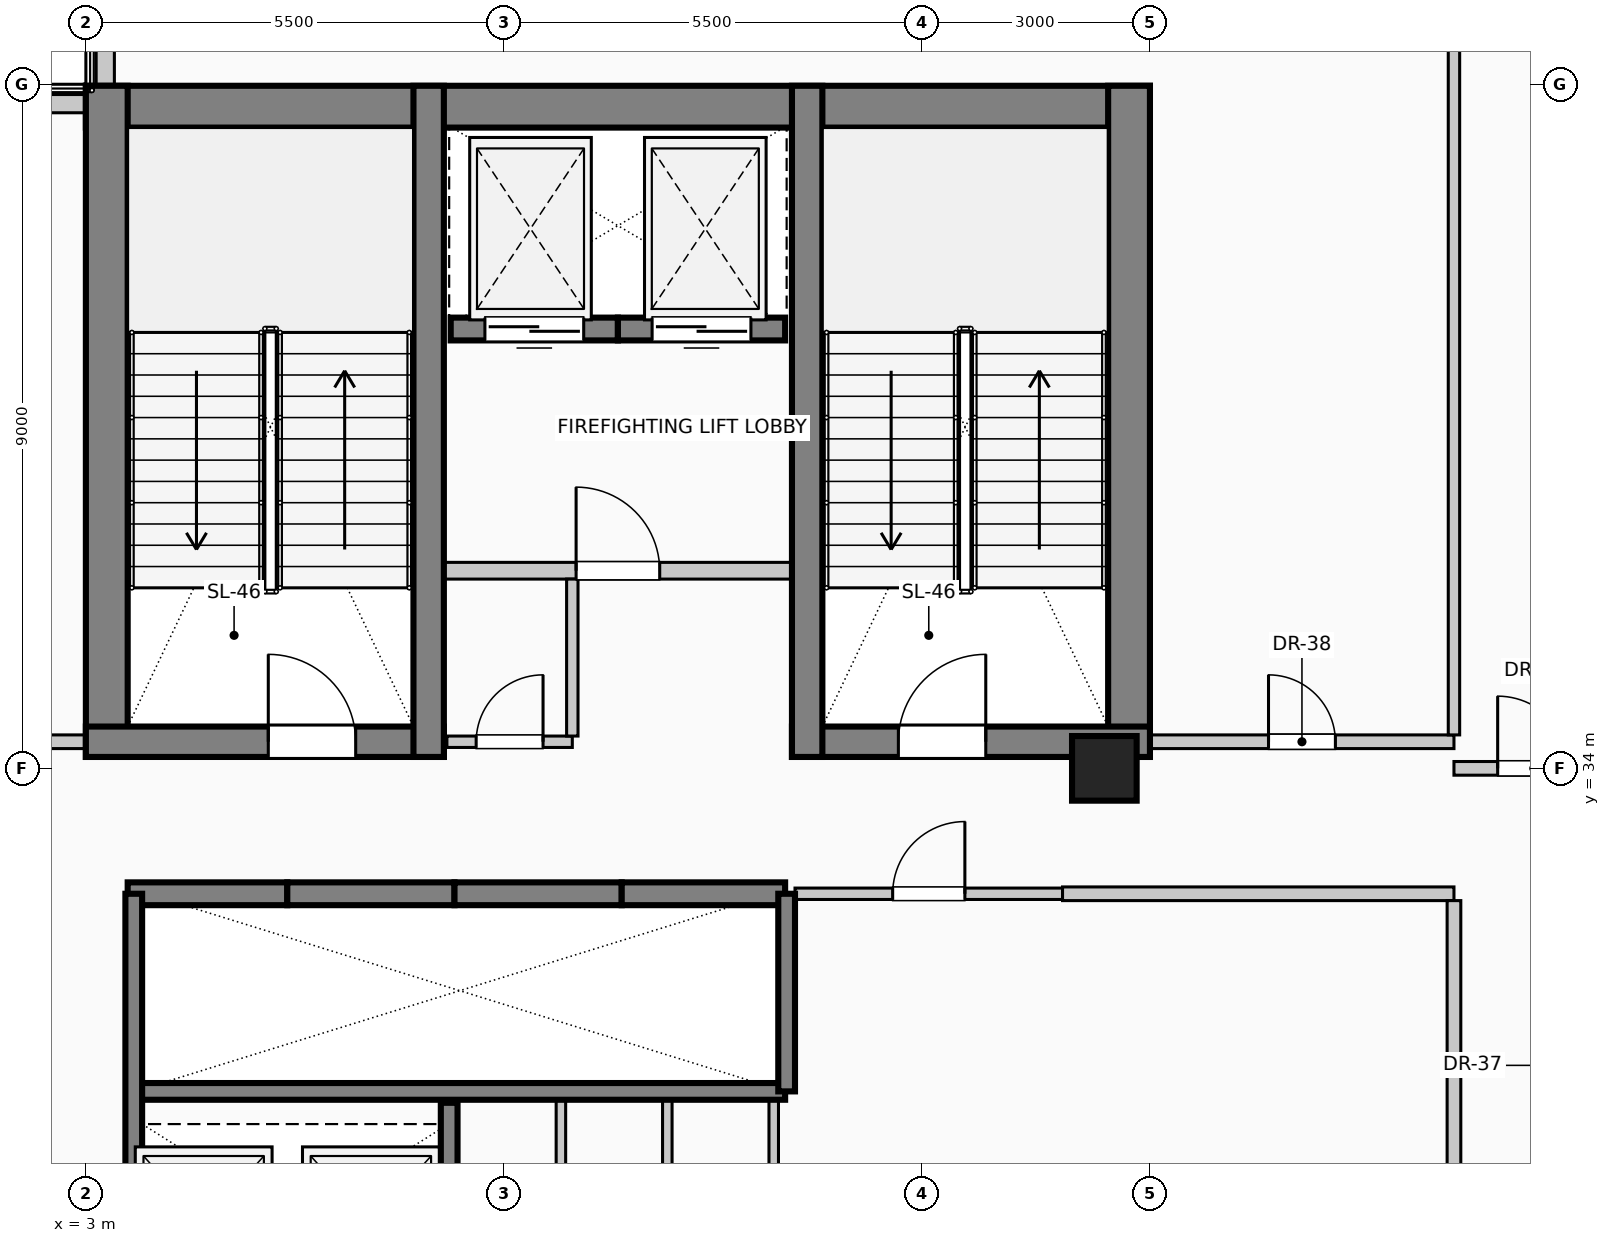
"""IFC4 building model, lengths in metres.
Left out: names, types, materials, properties, quantities, classifications, styles, units other than length and angle.
Written with IfcOpenShell. Run it as: python <this file> out.ifc"""

import sys

from ifc_helpers import new_model, si_unit, direction, frame, frame_2d, origin, origin_2d, place, context, subcontext, project, spatial, rectangle, circle, extrude, element, fill, save


model = new_model("IFC4")
c1 = context("Model", 3, precision=1e-05, world=origin(), true_north=direction((0.0, 1.0)))
c2 = subcontext(c1, "Body", "Model", "MODEL_VIEW")
j1 = project(units=[si_unit("LENGTHUNIT", "METRE"), si_unit("PLANEANGLEUNIT", "RADIAN")], contexts=[c1])
p1 = place(None, origin())
s1 = spatial("IfcSite", under=j1, at=p1, CompositionType="ELEMENT")
p2 = place(p1, origin())
s2 = spatial("IfcBuilding", under=s1, at=p2, CompositionType="ELEMENT")
p3 = place(p2, frame((0.0, 0.0, 313.0)))
s3 = spatial("IfcBuildingStorey", under=s2, at=p3, CompositionType="ELEMENT", Elevation=313.0)
p4 = place(p3, frame((3.0, 42.705, 0.0), z_axis=(0.0, 0.0, 1.0), x_axis=(1.0, 0.0, 0.0)))
e1 = element("IfcWall", 1, at=p4, inside=s3, PredefinedType="SHEAR", context=c2, shape_type="SweptSolid", body=[
    extrude(rectangle(XDim=14.0, YDim=0.55, at=frame_2d((7.0, 0.0))), origin(), (0.0, 0.0, 1.0), 4.8),
])
for number, where, z_axis, x_axis in (
    (2, (3.275, 34.15, 0.0), (0.0, 0.0, 1.0), (0.0, 1.0, 0.0)),
    (3, (16.725, 34.15, 0.0), (0.0, 0.0, 1.0), (0.0, 1.0, 0.0)),
):
    element("IfcWall", number, at=place(p3, frame(where, z_axis=z_axis, x_axis=x_axis)), inside=s3, PredefinedType="SHEAR", context=c2, shape_type="SweptSolid", body=[
        extrude(rectangle(XDim=8.83, YDim=0.55, at=frame_2d((4.415, 0.0))), origin(), (0.0, 0.0, 1.0), 4.8),
    ])
p5 = place(p3, frame((3.0, 34.35, 0.0), z_axis=(0.0, 0.0, 1.0), x_axis=(1.0, 0.0, 0.0)))
e4 = element("IfcWall", 4, at=p5, inside=s3, PredefinedType="SHEAR", context=c2, shape_type="SweptSolid", body=[
    extrude(rectangle(XDim=4.71, YDim=0.4, at=frame_2d((2.355, 0.0))), origin(), (0.0, 0.0, 1.0), 4.8),
])
p6 = place(p5, frame((2.4, 0.0, 0.0)))
e5 = element("IfcOpeningElement", 5, at=p6, cuts=e4, PredefinedType="OPENING", context=c2, shape_type="SweptSolid", body=[
    extrude(rectangle(XDim=1.15, YDim=2.2, at=frame_2d((0.575, 1.1))), frame((0.0, 0.21, 0.0), z_axis=(0.0, -1.0, 0.0), x_axis=(1.0, 0.0, 0.0)), (0.0, 0.0, 1.0), 0.42),
])
p7 = place(p3, frame((12.29, 34.35, 0.0), z_axis=(0.0, 0.0, 1.0), x_axis=(1.0, 0.0, 0.0)))
e6 = element("IfcWall", 6, at=p7, inside=s3, PredefinedType="SHEAR", context=c2, shape_type="SweptSolid", body=[
    extrude(rectangle(XDim=4.71, YDim=0.4, at=frame_2d((2.355, 0.0))), origin(), (0.0, 0.0, 1.0), 4.8),
])
p8 = place(p7, frame((1.4, 0.0, 0.0)))
e7 = element("IfcOpeningElement", 7, at=p8, cuts=e6, PredefinedType="OPENING", context=c2, shape_type="SweptSolid", body=[
    extrude(rectangle(XDim=1.15, YDim=2.2, at=frame_2d((0.575, 1.1))), frame((0.0, 0.21, 0.0), z_axis=(0.0, -1.0, 0.0), x_axis=(1.0, 0.0, 0.0)), (0.0, 0.0, 1.0), 0.42),
])
for number, where, z_axis, x_axis in (
    (8, (7.51, 34.15, 0.0), (0.0, 0.0, 1.0), (0.0, 1.0, 0.0)),
    (9, (12.49, 34.15, 0.0), (0.0, 0.0, 1.0), (0.0, 1.0, 0.0)),
):
    element("IfcWall", number, at=place(p3, frame(where, z_axis=z_axis, x_axis=x_axis)), inside=s3, PredefinedType="SHEAR", context=c2, shape_type="SweptSolid", body=[
        extrude(rectangle(XDim=8.83, YDim=0.4, at=frame_2d((4.415, 0.0))), origin(), (0.0, 0.0, 1.0), 4.8),
    ])
p9 = place(p3, frame((16.4, 34.0, 0.0), z_axis=(0.0, 0.0, 1.0), x_axis=(1.0, 0.0, 0.0)))
e10 = element("IfcColumn", 10, at=p9, inside=s3, PredefinedType="COLUMN", context=c2, shape_type="SweptSolid", body=[
    extrude(circle(Radius=0.425, at=origin_2d()), origin(), (0.0, 0.0, 1.0), 4.8),
])
p10 = place(p3, frame((0.6, 42.745, 0.0), z_axis=(0.0, 0.0, 1.0), x_axis=(1.0, 0.0, 0.0)))
e11 = element("IfcWall", 11, at=p10, inside=s3, PredefinedType="SOLIDWALL", context=c2, shape_type="SweptSolid", body=[
    extrude(rectangle(XDim=2.395, YDim=0.24, at=frame_2d((1.198, 0.0))), origin(), (0.0, 0.0, 1.0), 4.46),
])
p11 = place(p3, frame((3.255, 42.985, 0.0), z_axis=(0.0, 0.0, 1.0), x_axis=(0.0, 1.0, 0.0)))
e12 = element("IfcWall", 12, at=p11, inside=s3, PredefinedType="SOLIDWALL", context=c2, shape_type="SweptSolid", body=[
    extrude(rectangle(XDim=2.415, YDim=0.24, at=frame_2d((1.208, 0.0))), origin(), (0.0, 0.0, 1.0), 4.46),
])
p12 = place(p3, frame((3.55, 32.35, 0.0), z_axis=(0.0, 0.0, 1.0), x_axis=(1.0, 0.0, 0.0)))
e13 = element("IfcWall", 13, at=p12, inside=s3, PredefinedType="SOLIDWALL", context=c2, shape_type="SweptSolid", body=[
    extrude(rectangle(XDim=2.1, YDim=0.3, at=frame_2d((1.05, 0.0))), origin(), (0.0, 0.0, 1.0), 4.8),
])
p13 = place(p3, frame((5.65, 32.35, 0.0), z_axis=(0.0, 0.0, 1.0), x_axis=(1.0, 0.0, 0.0)))
e14 = element("IfcWall", 14, at=p13, inside=s3, PredefinedType="SOLIDWALL", context=c2, shape_type="SweptSolid", body=[
    extrude(rectangle(XDim=2.2, YDim=0.3, at=frame_2d((1.1, 0.0))), origin(), (0.0, 0.0, 1.0), 4.8),
])
p14 = place(p3, frame((7.85, 32.35, 0.0), z_axis=(0.0, 0.0, 1.0), x_axis=(1.0, 0.0, 0.0)))
e15 = element("IfcWall", 15, at=p14, inside=s3, PredefinedType="SOLIDWALL", context=c2, shape_type="SweptSolid", body=[
    extrude(rectangle(XDim=2.2, YDim=0.3, at=frame_2d((1.1, 0.0))), origin(), (0.0, 0.0, 1.0), 4.8),
])
p15 = place(p3, frame((10.05, 32.35, 0.0), z_axis=(0.0, 0.0, 1.0), x_axis=(1.0, 0.0, 0.0)))
e16 = element("IfcWall", 16, at=p15, inside=s3, PredefinedType="SOLIDWALL", context=c2, shape_type="SweptSolid", body=[
    extrude(rectangle(XDim=2.15, YDim=0.3, at=frame_2d((1.075, 0.0))), origin(), (0.0, 0.0, 1.0), 4.8),
])
p16 = place(p3, frame((10.0, 39.78, 0.0), z_axis=(0.0, 0.0, 1.0), x_axis=(-1.0, 0.0, 0.0)))
e17 = element("IfcWall", 17, at=p16, inside=s3, PredefinedType="SOLIDWALL", context=c2, shape_type="SweptSolid", body=[
    extrude(rectangle(XDim=2.2, YDim=0.3, at=frame_2d((1.1, 0.0))), origin(), (0.0, 0.0, 1.0), 4.8),
])
p17 = place(p16, frame((0.45, 0.0, 0.0)))
e18 = element("IfcOpeningElement", 18, at=p17, cuts=e17, PredefinedType="OPENING", context=c2, shape_type="SweptSolid", body=[
    extrude(rectangle(XDim=1.3, YDim=2.25, at=frame_2d((0.65, 1.125))), frame((0.0, 0.16, 0.0), z_axis=(0.0, -1.0, 0.0), x_axis=(1.0, 0.0, 0.0)), (0.0, 0.0, 1.0), 0.32),
])
p18 = place(p3, frame((12.2, 39.78, 0.0), z_axis=(0.0, 0.0, 1.0), x_axis=(-1.0, 0.0, 0.0)))
e19 = element("IfcWall", 19, at=p18, inside=s3, PredefinedType="SOLIDWALL", context=c2, shape_type="SweptSolid", body=[
    extrude(rectangle(XDim=2.2, YDim=0.3, at=frame_2d((1.1, 0.0))), origin(), (0.0, 0.0, 1.0), 4.8),
])
p19 = place(p18, frame((0.45, 0.0, 0.0)))
e20 = element("IfcOpeningElement", 20, at=p19, cuts=e19, PredefinedType="OPENING", context=c2, shape_type="SweptSolid", body=[
    extrude(rectangle(XDim=1.3, YDim=2.25, at=frame_2d((0.65, 1.125))), frame((0.0, 0.16, 0.0), z_axis=(0.0, -1.0, 0.0), x_axis=(1.0, 0.0, 0.0)), (0.0, 0.0, 1.0), 0.32),
])
p20 = place(p3, frame((3.55, 29.75, 0.0), z_axis=(0.0, 0.0, 1.0), x_axis=(1.0, 0.0, 0.0)))
e21 = element("IfcWall", 21, at=p20, inside=s3, PredefinedType="SOLIDWALL", context=c2, shape_type="SweptSolid", body=[
    extrude(rectangle(XDim=8.65, YDim=0.22, at=frame_2d((4.325, 0.0))), origin(), (0.0, 0.0, 1.0), 4.8),
])
p21 = place(p3, frame((3.63, 26.8, 0.0), z_axis=(0.0, 0.0, 1.0), x_axis=(0.0, 1.0, 0.0)))
e22 = element("IfcWall", 22, at=p21, inside=s3, PredefinedType="SOLIDWALL", context=c2, shape_type="SweptSolid", body=[
    extrude(rectangle(XDim=5.55, YDim=0.22, at=frame_2d((2.775, 0.0))), origin(), (0.0, 0.0, 1.0), 4.8),
])
p22 = place(p3, frame((7.78, 26.8, 0.0), z_axis=(0.0, 0.0, 1.0), x_axis=(0.0, 1.0, 0.0)))
e23 = element("IfcWall", 23, at=p22, inside=s3, PredefinedType="SOLIDWALL", context=c2, shape_type="SweptSolid", body=[
    extrude(rectangle(XDim=2.8, YDim=0.22, at=frame_2d((1.4, 0.0))), origin(), (0.0, 0.0, 1.0), 4.8),
])
p23 = place(p3, frame((12.22, 29.75, 0.0), z_axis=(0.0, 0.0, 1.0), x_axis=(0.0, 1.0, 0.0)))
e24 = element("IfcWall", 24, at=p23, inside=s3, PredefinedType="SOLIDWALL", context=c2, shape_type="SweptSolid", body=[
    extrude(rectangle(XDim=2.6, YDim=0.22, at=frame_2d((1.3, 0.0))), origin(), (0.0, 0.0, 1.0), 4.8),
])
p24 = place(p3, frame((7.51, 36.6, 0.0), z_axis=(0.0, 0.0, 1.0), x_axis=(1.0, 0.0, 0.0)))
e25 = element("IfcWall", 25, at=p24, inside=s3, PredefinedType="PARTITIONING", context=c2, shape_type="SweptSolid", body=[
    extrude(rectangle(XDim=4.98, YDim=0.22, at=frame_2d((2.49, 0.0))), origin(), (0.0, 0.0, 1.0), 4.46),
])
p25 = place(p24, frame((1.94, 0.0, 0.0)))
e26 = element("IfcOpeningElement", 26, at=p25, cuts=e25, PredefinedType="OPENING", context=c2, shape_type="SweptSolid", body=[
    extrude(rectangle(XDim=1.1, YDim=2.2, at=frame_2d((0.55, 1.1))), frame((0.0, 0.12, 0.0), z_axis=(0.0, -1.0, 0.0), x_axis=(1.0, 0.0, 0.0)), (0.0, 0.0, 1.0), 0.24),
])
p26 = place(p3, frame((12.33, 32.35, 0.0), z_axis=(0.0, 0.0, 1.0), x_axis=(1.0, 0.0, 0.0)))
e27 = element("IfcWall", 27, at=p26, inside=s3, PredefinedType="PARTITIONING", context=c2, shape_type="SweptSolid", body=[
    extrude(rectangle(XDim=3.52, YDim=0.15, at=frame_2d((1.76, 0.0))), origin(), (0.0, 0.0, 1.0), 4.46),
])
p27 = place(p26, frame((1.285, 0.0, 0.0)))
e28 = element("IfcOpeningElement", 28, at=p27, cuts=e27, PredefinedType="OPENING", context=c2, shape_type="SweptSolid", body=[
    extrude(rectangle(XDim=0.95, YDim=2.15, at=frame_2d((0.475, 1.075))), frame((0.0, 0.085, 0.0), z_axis=(0.0, -1.0, 0.0), x_axis=(1.0, 0.0, 0.0)), (0.0, 0.0, 1.0), 0.17),
])
p28 = place(p3, frame((15.85, 32.35, 0.0), z_axis=(0.0, 0.0, 1.0), x_axis=(1.0, 0.0, 0.0)))
e29 = element("IfcWall", 29, at=p28, inside=s3, PredefinedType="PARTITIONING", context=c2, shape_type="SweptSolid", body=[
    extrude(rectangle(XDim=5.15, YDim=0.18, at=frame_2d((2.575, 0.0))), origin(), (0.0, 0.0, 1.0), 4.46),
])
p29 = place(p3, frame((21.0, 34.0, 0.0), z_axis=(0.0, 0.0, 1.0), x_axis=(1.0, 0.0, 0.0)))
e30 = element("IfcWall", 30, at=p29, inside=s3, PredefinedType="PARTITIONING", context=c2, shape_type="SweptSolid", body=[
    extrude(rectangle(XDim=2.1, YDim=0.18, at=frame_2d((1.05, 0.0))), origin(), (0.0, 0.0, 1.0), 2.855),
])
p30 = place(p29, frame((0.575, 0.0, 0.0)))
e31 = element("IfcOpeningElement", 31, at=p30, cuts=e30, PredefinedType="OPENING", context=c2, shape_type="SweptSolid", body=[
    extrude(rectangle(XDim=0.95, YDim=2.15, at=frame_2d((0.475, 1.075))), frame((0.0, 0.1, 0.0), z_axis=(0.0, -1.0, 0.0), x_axis=(1.0, 0.0, 0.0)), (0.0, 0.0, 1.0), 0.2),
])
p31 = place(p3, frame((1.05, 34.35, 0.0), z_axis=(0.0, 0.0, 1.0), x_axis=(1.0, 0.0, 0.0)))
e32 = element("IfcWall", 32, at=p31, inside=s3, PredefinedType="PARTITIONING", context=c2, shape_type="SweptSolid", body=[
    extrude(rectangle(XDim=1.95, YDim=0.18, at=frame_2d((0.975, 0.0))), origin(), (0.0, 0.0, 1.0), 4.46),
])
p32 = place(p3, frame((7.75, 34.35, 0.0), z_axis=(0.0, 0.0, 1.0), x_axis=(1.0, 0.0, 0.0)))
e33 = element("IfcWall", 33, at=p32, inside=s3, PredefinedType="PARTITIONING", context=c2, shape_type="SweptSolid", body=[
    extrude(rectangle(XDim=1.65, YDim=0.15, at=frame_2d((0.825, 0.0))), origin(), (0.0, 0.0, 1.0), 4.46),
])
p33 = place(p32, frame((0.385, 0.0, 0.0)))
e34 = element("IfcOpeningElement", 34, at=p33, cuts=e33, PredefinedType="OPENING", context=c2, shape_type="SweptSolid", body=[
    extrude(rectangle(XDim=0.88, YDim=2.1, at=frame_2d((0.44, 1.05))), frame((0.0, 0.085, 0.0), z_axis=(0.0, -1.0, 0.0), x_axis=(1.0, 0.0, 0.0)), (0.0, 0.0, 1.0), 0.17),
])
p34 = place(p3, frame((17.0, 34.35, 0.0), z_axis=(0.0, 0.0, 1.0), x_axis=(1.0, 0.0, 0.0)))
e35 = element("IfcWall", 35, at=p34, inside=s3, PredefinedType="PARTITIONING", context=c2, shape_type="SweptSolid", body=[
    extrude(rectangle(XDim=4.0, YDim=0.18, at=frame_2d((2.0, 0.0))), origin(), (0.0, 0.0, 1.0), 2.855),
])
p35 = place(p34, frame((1.56, 0.0, 0.0)))
e36 = element("IfcOpeningElement", 36, at=p35, cuts=e35, PredefinedType="OPENING", context=c2, shape_type="SweptSolid", body=[
    extrude(rectangle(XDim=0.88, YDim=2.1, at=frame_2d((0.44, 1.05))), frame((0.0, 0.1, 0.0), z_axis=(0.0, -1.0, 0.0), x_axis=(1.0, 0.0, 0.0)), (0.0, 0.0, 1.0), 0.2),
])
p36 = place(p3, frame((9.25, 26.863, 0.0), z_axis=(0.0, 0.0, 1.0), x_axis=(0.0, 1.0, 0.0)))
e37 = element("IfcWall", 37, at=p36, inside=s3, PredefinedType="PARTITIONING", context=c2, shape_type="SweptSolid", body=[
    extrude(rectangle(XDim=2.777, YDim=0.125, at=frame_2d((1.389, 0.0))), origin(), (0.0, 0.0, 1.0), 4.46),
])
p37 = place(p3, frame((9.4, 34.425, 0.0), z_axis=(0.0, 0.0, 1.0), x_axis=(0.0, 1.0, 0.0)))
e38 = element("IfcWall", 38, at=p37, inside=s3, PredefinedType="PARTITIONING", context=c2, shape_type="SweptSolid", body=[
    extrude(rectangle(XDim=2.065, YDim=0.15, at=frame_2d((1.032, 0.0))), origin(), (0.0, 0.0, 1.0), 4.46),
])
for number, where, z_axis, x_axis in (
    (39, (10.65, 26.863, 0.0), (0.0, 0.0, 1.0), (0.0, 1.0, 0.0)),
    (40, (12.05, 26.863, 0.0), (0.0, 0.0, 1.0), (0.0, 1.0, 0.0)),
):
    element("IfcWall", number, at=place(p3, frame(where, z_axis=z_axis, x_axis=x_axis)), inside=s3, PredefinedType="PARTITIONING", context=c2, shape_type="SweptSolid", body=[
        extrude(rectangle(XDim=2.777, YDim=0.125, at=frame_2d((1.389, 0.0))), origin(), (0.0, 0.0, 1.0), 4.46),
    ])
p38 = place(p3, frame((21.0, 24.875, 0.0), z_axis=(0.0, 0.0, 1.0), x_axis=(0.0, 1.0, 0.0)))
e41 = element("IfcWall", 41, at=p38, inside=s3, PredefinedType="PARTITIONING", context=c2, shape_type="SweptSolid", body=[
    extrude(rectangle(XDim=7.385, YDim=0.18, at=frame_2d((3.692, 0.0))), origin(), (0.0, 0.0, 1.0), 4.46),
])
p39 = place(p3, frame((21.0, 34.44, 0.0), z_axis=(0.0, 0.0, 1.0), x_axis=(0.0, 1.0, 0.0)))
e42 = element("IfcWall", 42, at=p39, inside=s3, PredefinedType="PARTITIONING", context=c2, shape_type="SweptSolid", body=[
    extrude(rectangle(XDim=10.84, YDim=0.15, at=frame_2d((5.42, 0.0))), origin(), (0.0, 0.0, 1.0), 4.46),
])
p40 = place(p17, origin())
e43 = element("IfcDoor", 43, at=p40, inside=s3, OperationType="SLIDING_TO_LEFT", PredefinedType="DOOR", context=c2, shape_type="SweptSolid", body=[
    extrude(rectangle(XDim=1.3, YDim=2.25, at=frame_2d((0.65, 1.125))), frame((0.0, 0.025, 0.0), z_axis=(0.0, -1.0, 0.0), x_axis=(1.0, 0.0, 0.0)), (0.0, 0.0, 1.0), 0.05),
])
fill(e18, e43)
p41 = place(p19, origin())
e44 = element("IfcDoor", 44, at=p41, inside=s3, OperationType="SLIDING_TO_RIGHT", PredefinedType="DOOR", context=c2, shape_type="SweptSolid", body=[
    extrude(rectangle(XDim=1.3, YDim=2.25, at=frame_2d((0.65, 1.125))), frame((0.0, 0.025, 0.0), z_axis=(0.0, -1.0, 0.0), x_axis=(1.0, 0.0, 0.0)), (0.0, 0.0, 1.0), 0.05),
])
fill(e20, e44)
p42 = place(p6, origin())
e45 = element("IfcDoor", 45, at=p42, inside=s3, OperationType="SINGLE_SWING_LEFT", PredefinedType="DOOR", context=c2, shape_type="SweptSolid", body=[
    extrude(rectangle(XDim=1.15, YDim=2.2, at=frame_2d((0.575, 1.1))), frame((0.0, 0.025, 0.0), z_axis=(0.0, -1.0, 0.0), x_axis=(1.0, 0.0, 0.0)), (0.0, 0.0, 1.0), 0.05),
])
fill(e5, e45)
p43 = place(p8, origin())
e46 = element("IfcDoor", 46, at=p43, inside=s3, OperationType="SINGLE_SWING_RIGHT", PredefinedType="DOOR", context=c2, shape_type="SweptSolid", body=[
    extrude(rectangle(XDim=1.15, YDim=2.2, at=frame_2d((0.575, 1.1))), frame((0.0, 0.025, 0.0), z_axis=(0.0, -1.0, 0.0), x_axis=(1.0, 0.0, 0.0)), (0.0, 0.0, 1.0), 0.05),
])
fill(e7, e46)
p44 = place(p25, origin())
e47 = element("IfcDoor", 47, at=p44, inside=s3, OperationType="SINGLE_SWING_LEFT", PredefinedType="DOOR", context=c2, shape_type="SweptSolid", body=[
    extrude(rectangle(XDim=1.1, YDim=2.2, at=frame_2d((0.55, 1.1))), frame((0.0, 0.025, 0.0), z_axis=(0.0, -1.0, 0.0), x_axis=(1.0, 0.0, 0.0)), (0.0, 0.0, 1.0), 0.05),
])
fill(e26, e47)
p45 = place(p27, origin())
e48 = element("IfcDoor", 48, at=p45, inside=s3, OperationType="SINGLE_SWING_RIGHT", PredefinedType="DOOR", context=c2, shape_type="SweptSolid", body=[
    extrude(rectangle(XDim=0.95, YDim=2.15, at=frame_2d((0.475, 1.075))), frame((0.0, 0.025, 0.0), z_axis=(0.0, -1.0, 0.0), x_axis=(1.0, 0.0, 0.0)), (0.0, 0.0, 1.0), 0.05),
])
fill(e28, e48)
p46 = place(p30, origin())
e49 = element("IfcDoor", 49, at=p46, inside=s3, OperationType="SINGLE_SWING_LEFT", PredefinedType="DOOR", context=c2, shape_type="SweptSolid", body=[
    extrude(rectangle(XDim=0.95, YDim=2.15, at=frame_2d((0.475, 1.075))), frame((0.0, 0.025, 0.0), z_axis=(0.0, -1.0, 0.0), x_axis=(1.0, 0.0, 0.0)), (0.0, 0.0, 1.0), 0.05),
])
fill(e31, e49)
p47 = place(p33, origin())
e50 = element("IfcDoor", 50, at=p47, inside=s3, OperationType="SINGLE_SWING_RIGHT", PredefinedType="DOOR", context=c2, shape_type="SweptSolid", body=[
    extrude(rectangle(XDim=0.88, YDim=2.1, at=frame_2d((0.44, 1.05))), frame((0.0, 0.025, 0.0), z_axis=(0.0, -1.0, 0.0), x_axis=(1.0, 0.0, 0.0)), (0.0, 0.0, 1.0), 0.05),
])
fill(e34, e50)
p48 = place(p35, origin())
e51 = element("IfcDoor", 51, at=p48, inside=s3, OperationType="SINGLE_SWING_LEFT", PredefinedType="DOOR", context=c2, shape_type="SweptSolid", body=[
    extrude(rectangle(XDim=0.88, YDim=2.1, at=frame_2d((0.44, 1.05))), frame((0.0, 0.025, 0.0), z_axis=(0.0, -1.0, 0.0), x_axis=(1.0, 0.0, 0.0)), (0.0, 0.0, 1.0), 0.05),
])
fill(e36, e51)
save(model, sys.argv[1])
